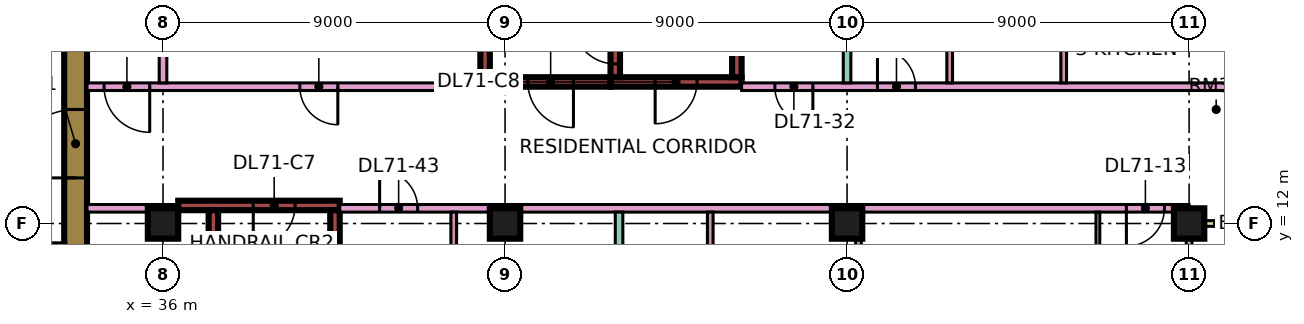
"""IFC4 building model, lengths in metres.
Left out: names, types, materials, properties, quantities, classifications, styles, units other than length and angle.
Written with IfcOpenShell. Run it as: python <this file> out.ifc"""

import sys

from ifc_helpers import new_model, si_unit, direction, frame, frame_2d, origin, origin_2d, place, context, subcontext, project, spatial, rectangle, extrude, element, fill, save


model = new_model("IFC4")
c1 = context("Model", 3, precision=1e-05, world=origin(), true_north=direction((0.0, 1.0)))
c2 = subcontext(c1, "Body", "Model", "MODEL_VIEW")
j1 = project(units=[si_unit("LENGTHUNIT", "METRE"), si_unit("PLANEANGLEUNIT", "RADIAN")], contexts=[c1])
p1 = place(None, origin())
s1 = spatial("IfcSite", under=j1, at=p1, CompositionType="ELEMENT")
p2 = place(p1, origin())
s2 = spatial("IfcBuilding", under=s1, at=p2, CompositionType="ELEMENT")
p3 = place(p2, frame((0.0, 0.0, 303.4)))
s3 = spatial("IfcBuildingStorey", under=s2, at=p3, CompositionType="ELEMENT", Elevation=303.4)
for number, where, z_axis, x_axis in (
    (1, (36.0, 12.0, 0.0), (0.0, 0.0, 1.0), (1.0, 0.0, 0.0)),
    (2, (45.0, 12.0, 0.0), (0.0, 0.0, 1.0), (1.0, 0.0, 0.0)),
    (3, (54.0, 12.0, 0.0), (0.0, 0.0, 1.0), (1.0, 0.0, 0.0)),
    (4, (63.0, 12.0, 0.0), (0.0, 0.0, 1.0), (1.0, 0.0, 0.0)),
):
    element("IfcColumn", number, at=place(p3, frame(where, z_axis=z_axis, x_axis=x_axis)), inside=s3, PredefinedType="COLUMN", context=c2, shape_type="SweptSolid", body=[
        extrude(rectangle(XDim=0.8, YDim=0.8, at=origin_2d()), origin(), (0.0, 0.0, 1.0), 3.75),
    ])
p4 = place(p3, frame((33.7, 7.6, 0.0), z_axis=(0.0, 0.0, 1.0), x_axis=(0.0, 1.0, 0.0)))
e5 = element("IfcWall", 5, at=p4, inside=s3, PredefinedType="SHEAR", context=c2, shape_type="SweptSolid", body=[
    extrude(rectangle(XDim=11.8, YDim=0.6, at=frame_2d((5.9, 0.0))), origin(), (0.0, 0.0, 1.0), 3.75),
])
p5 = place(p4, frame((5.6, 0.0, 0.0)))
e6 = element("IfcOpeningElement", 6, at=p5, cuts=e5, PredefinedType="OPENING", context=c2, shape_type="SweptSolid", body=[
    extrude(rectangle(XDim=1.8, YDim=2.4, at=frame_2d((0.9, 1.2))), frame((0.0, 0.31, 0.0), z_axis=(0.0, -1.0, 0.0), x_axis=(1.0, 0.0, 0.0)), (0.0, 0.0, 1.0), 0.62),
])
p6 = place(p3, frame((36.4, 12.475, 0.0), z_axis=(0.0, 0.0, 1.0), x_axis=(1.0, 0.0, 0.0)))
e7 = element("IfcWall", 7, at=p6, inside=s3, PredefinedType="SHEAR", context=c2, shape_type="SweptSolid", body=[
    extrude(rectangle(XDim=4.25, YDim=0.25, at=frame_2d((2.125, 0.0))), origin(), (0.0, 0.0, 1.0), 3.75),
])
p7 = place(p6, frame((1.975, 0.0, 0.0)))
e8 = element("IfcOpeningElement", 8, at=p7, cuts=e7, PredefinedType="OPENING", context=c2, shape_type="SweptSolid", body=[
    extrude(rectangle(XDim=1.1, YDim=2.2, at=frame_2d((0.55, 1.1))), frame((0.0, 0.135, 0.0), z_axis=(0.0, -1.0, 0.0), x_axis=(1.0, 0.0, 0.0)), (0.0, 0.0, 1.0), 0.27),
])
for number, where, z_axis, x_axis in (
    (9, (37.325, 5.85, 0.0), (0.0, 0.0, 1.0), (0.0, 1.0, 0.0)),
    (10, (40.525, 5.85, 0.0), (0.0, 0.0, 1.0), (0.0, 1.0, 0.0)),
):
    element("IfcWall", number, at=place(p3, frame(where, z_axis=z_axis, x_axis=x_axis)), inside=s3, PredefinedType="SHEAR", context=c2, shape_type="SweptSolid", body=[
        extrude(rectangle(XDim=6.5, YDim=0.25, at=frame_2d((3.25, 0.0))), origin(), (0.0, 0.0, 1.0), 3.75),
    ])
p8 = place(p3, frame((47.775, 15.725, 0.0), z_axis=(0.0, 0.0, 1.0), x_axis=(1.0, 0.0, 0.0)))
e11 = element("IfcWall", 11, at=p8, inside=s3, PredefinedType="SHEAR", context=c2, shape_type="SweptSolid", body=[
    extrude(rectangle(XDim=3.45, YDim=0.25, at=frame_2d((1.725, 0.0))), origin(), (0.0, 0.0, 1.0), 3.75),
])
p9 = place(p8, frame((1.175, 0.0, 0.0)))
e12 = element("IfcOpeningElement", 12, at=p9, cuts=e11, PredefinedType="OPENING", context=c2, shape_type="SweptSolid", body=[
    extrude(rectangle(XDim=1.1, YDim=2.2, at=frame_2d((0.55, 1.1))), frame((0.0, 0.135, 0.0), z_axis=(0.0, -1.0, 0.0), x_axis=(1.0, 0.0, 0.0)), (0.0, 0.0, 1.0), 0.27),
])
p10 = place(p3, frame((47.9, 15.85, 0.0), z_axis=(0.0, 0.0, 1.0), x_axis=(0.0, 1.0, 0.0)))
e13 = element("IfcWall", 13, at=p10, inside=s3, PredefinedType="SHEAR", context=c2, shape_type="SweptSolid", body=[
    extrude(rectangle(XDim=6.5, YDim=0.25, at=frame_2d((3.25, 0.0))), origin(), (0.0, 0.0, 1.0), 3.75),
])
p11 = place(p10, frame((0.35, 0.0, 0.0)))
e14 = element("IfcOpeningElement", 14, at=p11, cuts=e13, PredefinedType="OPENING", context=c2, shape_type="SweptSolid", body=[
    extrude(rectangle(XDim=1.1, YDim=2.2, at=frame_2d((0.55, 1.1))), frame((0.0, 0.135, 0.0), z_axis=(0.0, -1.0, 0.0), x_axis=(1.0, 0.0, 0.0)), (0.0, 0.0, 1.0), 0.27),
])
p12 = place(p3, frame((51.1, 15.85, 0.0), z_axis=(0.0, 0.0, 1.0), x_axis=(0.0, 1.0, 0.0)))
e15 = element("IfcWall", 15, at=p12, inside=s3, PredefinedType="SHEAR", context=c2, shape_type="SweptSolid", body=[
    extrude(rectangle(XDim=6.5, YDim=0.25, at=frame_2d((3.25, 0.0))), origin(), (0.0, 0.0, 1.0), 3.75),
])
p13 = place(p3, frame((44.35, 15.725, 0.0), z_axis=(0.0, 0.0, 1.0), x_axis=(1.0, 0.0, 0.0)))
e16 = element("IfcWall", 16, at=p13, inside=s3, PredefinedType="SHEAR", context=c2, shape_type="SweptSolid", body=[
    extrude(rectangle(XDim=3.425, YDim=0.25, at=frame_2d((1.712, 0.0))), origin(), (0.0, 0.0, 1.0), 3.75),
])
p14 = place(p13, frame((1.25, 0.0, 0.0)))
e17 = element("IfcOpeningElement", 17, at=p14, cuts=e16, PredefinedType="OPENING", context=c2, shape_type="SweptSolid", body=[
    extrude(rectangle(XDim=1.2, YDim=2.2, at=frame_2d((0.6, 1.1))), frame((0.0, 0.135, 0.0), z_axis=(0.0, -1.0, 0.0), x_axis=(1.0, 0.0, 0.0)), (0.0, 0.0, 1.0), 0.27),
])
p15 = place(p3, frame((44.475, 15.85, 0.0), z_axis=(0.0, 0.0, 1.0), x_axis=(0.0, 1.0, 0.0)))
e18 = element("IfcWall", 18, at=p15, inside=s3, PredefinedType="SHEAR", context=c2, shape_type="SweptSolid", body=[
    extrude(rectangle(XDim=6.5, YDim=0.25, at=frame_2d((3.25, 0.0))), origin(), (0.0, 0.0, 1.0), 3.75),
])
p16 = place(p15, frame((1.75, 0.0, 0.0)))
e19 = element("IfcOpeningElement", 19, at=p16, cuts=e18, PredefinedType="OPENING", context=c2, shape_type="SweptSolid", body=[
    extrude(rectangle(XDim=1.1, YDim=2.2, at=frame_2d((0.55, 1.1))), frame((0.0, 0.135, 0.0), z_axis=(0.0, -1.0, 0.0), x_axis=(1.0, 0.0, 0.0)), (0.0, 0.0, 1.0), 0.27),
])
p17 = place(p15, frame((4.3, 0.0, 0.0)))
e20 = element("IfcOpeningElement", 20, at=p17, cuts=e18, PredefinedType="OPENING", context=c2, shape_type="SweptSolid", body=[
    extrude(rectangle(XDim=1.1, YDim=2.2, at=frame_2d((0.55, 1.1))), frame((0.0, 0.135, 0.0), z_axis=(0.0, -1.0, 0.0), x_axis=(1.0, 0.0, 0.0)), (0.0, 0.0, 1.0), 0.27),
])
p18 = place(p3, frame((63.0, 1.575, 0.0), z_axis=(0.0, 0.0, 1.0), x_axis=(0.0, 1.0, 0.0)))
e21 = element("IfcWall", 21, at=p18, inside=s3, PredefinedType="SOLIDWALL", context=c2, shape_type="SweptSolid", body=[
    extrude(rectangle(XDim=10.35, YDim=0.15, at=frame_2d((5.175, 0.0))), origin(), (0.0, 0.0, 1.0), 3.35),
])
p19 = place(p18, frame((4.062, 0.0, 0.0)))
e22 = element("IfcOpeningElement", 22, at=p19, cuts=e21, PredefinedType="OPENING", context=c2, shape_type="SweptSolid", body=[
    extrude(rectangle(XDim=1.8, YDim=2.4, at=frame_2d((0.9, 1.2))), frame((0.0, 0.085, 0.0), z_axis=(0.0, -1.0, 0.0), x_axis=(1.0, 0.0, 0.0)), (0.0, 0.0, 1.0), 0.17),
])
p20 = place(p3, frame((64.5, 12.0, 0.0), z_axis=(0.0, 0.0, 1.0), x_axis=(-1.0, 0.0, 0.0)))
e23 = element("IfcWall", 23, at=p20, inside=s3, PredefinedType="SOLIDWALL", context=c2, shape_type="SweptSolid", body=[
    extrude(rectangle(XDim=1.5, YDim=0.15, at=frame_2d((0.75, 0.0))), origin(), (0.0, 0.0, 1.0), 3.35),
])
p21 = place(p3, frame((34.0, 12.4, 0.0), z_axis=(0.0, 0.0, 1.0), x_axis=(1.0, 0.0, 0.0)))
e24 = element("IfcWall", 24, at=p21, inside=s3, PredefinedType="PARTITIONING", context=c2, shape_type="SweptSolid", body=[
    extrude(rectangle(XDim=2.401, YDim=0.2, at=frame_2d((1.2, 0.0))), origin(), (0.0, 0.0, 1.0), 3.35),
])
p22 = place(p3, frame((34.0, 15.6, 0.0), z_axis=(0.0, 0.0, 1.0), x_axis=(1.0, 0.0, 0.0)))
e25 = element("IfcWall", 25, at=p22, inside=s3, PredefinedType="PARTITIONING", context=c2, shape_type="SweptSolid", body=[
    extrude(rectangle(XDim=10.35, YDim=0.2, at=frame_2d((5.175, 0.0))), origin(), (0.0, 0.0, 1.0), 3.35),
])
p23 = place(p22, frame((5.6, 0.0, 0.0)))
e26 = element("IfcOpeningElement", 26, at=p23, cuts=e25, PredefinedType="OPENING", context=c2, shape_type="SweptSolid", body=[
    extrude(rectangle(XDim=1.0, YDim=2.1, at=frame_2d((0.5, 1.05))), frame((0.0, 0.11, 0.0), z_axis=(0.0, -1.0, 0.0), x_axis=(1.0, 0.0, 0.0)), (0.0, 0.0, 1.0), 0.22),
])
p24 = place(p22, frame((0.45, 0.0, 0.0)))
e27 = element("IfcOpeningElement", 27, at=p24, cuts=e25, PredefinedType="OPENING", context=c2, shape_type="SweptSolid", body=[
    extrude(rectangle(XDim=1.2, YDim=2.1, at=frame_2d((0.6, 1.05))), frame((0.0, 0.11, 0.0), z_axis=(0.0, -1.0, 0.0), x_axis=(1.0, 0.0, 0.0)), (0.0, 0.0, 1.0), 0.22),
])
p25 = place(p3, frame((36.0, 15.7, 0.0), z_axis=(0.0, 0.0, 1.0), x_axis=(0.0, 1.0, 0.0)))
e28 = element("IfcWall", 28, at=p25, inside=s3, PredefinedType="PARTITIONING", context=c2, shape_type="SweptSolid", body=[
    extrude(rectangle(XDim=8.3, YDim=0.2, at=frame_2d((4.15, 0.0))), origin(), (0.0, 0.0, 1.0), 3.35),
])
p26 = place(p3, frame((40.65, 12.4, 0.0), z_axis=(0.0, 0.0, 1.0), x_axis=(1.0, 0.0, 0.0)))
e29 = element("IfcWall", 29, at=p26, inside=s3, PredefinedType="PARTITIONING", context=c2, shape_type="SweptSolid", body=[
    extrude(rectangle(XDim=22.35, YDim=0.2, at=frame_2d((11.175, 0.0))), origin(), (0.0, 0.0, 1.0), 3.35),
])
p27 = place(p26, frame((20.7, 0.0, 0.0)))
e30 = element("IfcOpeningElement", 30, at=p27, cuts=e29, PredefinedType="OPENING", context=c2, shape_type="SweptSolid", body=[
    extrude(rectangle(XDim=1.0, YDim=2.1, at=frame_2d((0.5, 1.05))), frame((0.0, 0.11, 0.0), z_axis=(0.0, -1.0, 0.0), x_axis=(1.0, 0.0, 0.0)), (0.0, 0.0, 1.0), 0.22),
])
p28 = place(p26, frame((1.05, 0.0, 0.0)))
e31 = element("IfcOpeningElement", 31, at=p28, cuts=e29, PredefinedType="OPENING", context=c2, shape_type="SweptSolid", body=[
    extrude(rectangle(XDim=1.0, YDim=2.1, at=frame_2d((0.5, 1.05))), frame((0.0, 0.11, 0.0), z_axis=(0.0, -1.0, 0.0), x_axis=(1.0, 0.0, 0.0)), (0.0, 0.0, 1.0), 0.22),
])
p29 = place(p3, frame((43.65, 5.825, 0.0), z_axis=(0.0, 0.0, 1.0), x_axis=(0.0, 1.0, 0.0)))
e32 = element("IfcWall", 32, at=p29, inside=s3, PredefinedType="PARTITIONING", context=c2, shape_type="SweptSolid", body=[
    extrude(rectangle(XDim=6.475, YDim=0.15, at=frame_2d((3.238, 0.0))), origin(), (0.0, 0.0, 1.0), 3.35),
])
p30 = place(p29, frame((4.425, 0.0, 0.0)))
e33 = element("IfcOpeningElement", 33, at=p30, cuts=e32, PredefinedType="OPENING", context=c2, shape_type="SweptSolid", body=[
    extrude(rectangle(XDim=0.9, YDim=2.1, at=frame_2d((0.45, 1.05))), frame((0.0, 0.085, 0.0), z_axis=(0.0, -1.0, 0.0), x_axis=(1.0, 0.0, 0.0)), (0.0, 0.0, 1.0), 0.17),
])
p31 = place(p3, frame((48.0, 0.0, 0.0), z_axis=(0.0, 0.0, 1.0), x_axis=(0.0, 1.0, 0.0)))
e34 = element("IfcWall", 34, at=p31, inside=s3, PredefinedType="PARTITIONING", context=c2, shape_type="SweptSolid", body=[
    extrude(rectangle(XDim=12.3, YDim=0.2, at=frame_2d((6.15, 0.0))), origin(), (0.0, 0.0, 1.0), 3.35),
])
p32 = place(p3, frame((50.4, 7.675, 0.0), z_axis=(0.0, 0.0, 1.0), x_axis=(0.0, 1.0, 0.0)))
e35 = element("IfcWall", 35, at=p32, inside=s3, PredefinedType="PARTITIONING", context=c2, shape_type="SweptSolid", body=[
    extrude(rectangle(XDim=4.625, YDim=0.15, at=frame_2d((2.312, 0.0))), origin(), (0.0, 0.0, 1.0), 3.35),
])
p33 = place(p3, frame((51.225, 15.6, 0.0), z_axis=(0.0, 0.0, 1.0), x_axis=(1.0, 0.0, 0.0)))
e36 = element("IfcWall", 36, at=p33, inside=s3, PredefinedType="PARTITIONING", context=c2, shape_type="SweptSolid", body=[
    extrude(rectangle(XDim=13.125, YDim=0.2, at=frame_2d((6.562, 0.0))), origin(), (0.0, 0.0, 1.0), 3.35),
])
p34 = place(p33, frame((3.575, 0.0, 0.0)))
e37 = element("IfcOpeningElement", 37, at=p34, cuts=e36, PredefinedType="OPENING", context=c2, shape_type="SweptSolid", body=[
    extrude(rectangle(XDim=1.0, YDim=2.1, at=frame_2d((0.5, 1.05))), frame((0.0, 0.11, 0.0), z_axis=(0.0, -1.0, 0.0), x_axis=(1.0, 0.0, 0.0)), (0.0, 0.0, 1.0), 0.22),
])
p35 = place(p33, frame((0.875, 0.0, 0.0)))
e38 = element("IfcOpeningElement", 38, at=p35, cuts=e36, PredefinedType="OPENING", context=c2, shape_type="SweptSolid", body=[
    extrude(rectangle(XDim=1.0, YDim=2.1, at=frame_2d((0.5, 1.05))), frame((0.0, 0.11, 0.0), z_axis=(0.0, -1.0, 0.0), x_axis=(1.0, 0.0, 0.0)), (0.0, 0.0, 1.0), 0.22),
])
p36 = place(p3, frame((54.0, 15.7, 0.0), z_axis=(0.0, 0.0, 1.0), x_axis=(0.0, 1.0, 0.0)))
e39 = element("IfcWall", 39, at=p36, inside=s3, PredefinedType="PARTITIONING", context=c2, shape_type="SweptSolid", body=[
    extrude(rectangle(XDim=8.226, YDim=0.2, at=frame_2d((4.113, 0.0))), origin(), (0.0, 0.0, 1.0), 3.35),
])
p37 = place(p3, frame((54.3, 7.675, 0.0), z_axis=(0.0, 0.0, 1.0), x_axis=(0.0, 1.0, 0.0)))
e40 = element("IfcWall", 40, at=p37, inside=s3, PredefinedType="PARTITIONING", context=c2, shape_type="SweptSolid", body=[
    extrude(rectangle(XDim=4.625, YDim=0.15, at=frame_2d((2.312, 0.0))), origin(), (0.0, 0.0, 1.0), 3.35),
])
for number, where, z_axis, x_axis in (
    (41, (56.7, 15.7, 0.0), (0.0, 0.0, 1.0), (0.0, 1.0, 0.0)),
    (42, (59.7, 15.7, 0.0), (0.0, 0.0, 1.0), (0.0, 1.0, 0.0)),
):
    element("IfcWall", number, at=place(p3, frame(where, z_axis=z_axis, x_axis=x_axis)), inside=s3, PredefinedType="PARTITIONING", context=c2, shape_type="SweptSolid", body=[
        extrude(rectangle(XDim=2.525, YDim=0.15, at=frame_2d((1.263, 0.0))), origin(), (0.0, 0.0, 1.0), 3.35),
    ])
p38 = place(p3, frame((60.6, 7.675, 0.0), z_axis=(0.0, 0.0, 1.0), x_axis=(0.0, 1.0, 0.0)))
e43 = element("IfcWall", 43, at=p38, inside=s3, PredefinedType="PARTITIONING", context=c2, shape_type="SweptSolid", body=[
    extrude(rectangle(XDim=4.625, YDim=0.1, at=frame_2d((2.312, 0.0))), origin(), (0.0, 0.0, 1.0), 3.35),
])
p39 = place(p38, frame((1.875, 0.0, 0.0)))
e44 = element("IfcOpeningElement", 44, at=p39, cuts=e43, PredefinedType="OPENING", context=c2, shape_type="SweptSolid", body=[
    extrude(rectangle(XDim=0.9, YDim=2.1, at=frame_2d((0.45, 1.05))), frame((0.0, 0.06, 0.0), z_axis=(0.0, -1.0, 0.0), x_axis=(1.0, 0.0, 0.0)), (0.0, 0.0, 1.0), 0.12),
])
p40 = place(p5, origin())
e45 = element("IfcDoor", 45, at=p40, inside=s3, OperationType="DOUBLE_DOOR_SINGLE_SWING", PredefinedType="DOOR", context=c2, shape_type="SweptSolid", body=[
    extrude(rectangle(XDim=1.8, YDim=2.4, at=frame_2d((0.9, 1.2))), frame((0.0, 0.025, 0.0), z_axis=(0.0, -1.0, 0.0), x_axis=(1.0, 0.0, 0.0)), (0.0, 0.0, 1.0), 0.05),
])
fill(e6, e45)
p41 = place(p7, frame((1.1, 0.0, 0.0), z_axis=(0.0, 0.0, 1.0), x_axis=(-1.0, 0.0, 0.0)))
e46 = element("IfcDoor", 46, at=p41, inside=s3, OperationType="SINGLE_SWING_LEFT", PredefinedType="DOOR", context=c2, shape_type="SweptSolid", body=[
    extrude(rectangle(XDim=1.1, YDim=2.2, at=frame_2d((0.55, 1.1))), frame((0.0, 0.025, 0.0), z_axis=(0.0, -1.0, 0.0), x_axis=(1.0, 0.0, 0.0)), (0.0, 0.0, 1.0), 0.05),
])
fill(e8, e46)
p42 = place(p9, frame((1.1, 0.0, 0.0), z_axis=(0.0, 0.0, 1.0), x_axis=(-1.0, 0.0, 0.0)))
e47 = element("IfcDoor", 47, at=p42, inside=s3, OperationType="SINGLE_SWING_LEFT", PredefinedType="DOOR", context=c2, shape_type="SweptSolid", body=[
    extrude(rectangle(XDim=1.1, YDim=2.2, at=frame_2d((0.55, 1.1))), frame((0.0, 0.025, 0.0), z_axis=(0.0, -1.0, 0.0), x_axis=(1.0, 0.0, 0.0)), (0.0, 0.0, 1.0), 0.05),
])
fill(e12, e47)
p43 = place(p14, origin())
e48 = element("IfcDoor", 48, at=p43, inside=s3, OperationType="SINGLE_SWING_RIGHT", PredefinedType="DOOR", context=c2, shape_type="SweptSolid", body=[
    extrude(rectangle(XDim=1.2, YDim=2.2, at=frame_2d((0.6, 1.1))), frame((0.0, 0.025, 0.0), z_axis=(0.0, -1.0, 0.0), x_axis=(1.0, 0.0, 0.0)), (0.0, 0.0, 1.0), 0.05),
])
fill(e17, e48)
p44 = place(p11, frame((1.1, 0.0, 0.0), z_axis=(0.0, 0.0, 1.0), x_axis=(-1.0, 0.0, 0.0)))
e49 = element("IfcDoor", 49, at=p44, inside=s3, OperationType="SINGLE_SWING_RIGHT", PredefinedType="DOOR", context=c2, shape_type="SweptSolid", body=[
    extrude(rectangle(XDim=1.1, YDim=2.2, at=frame_2d((0.55, 1.1))), frame((0.0, 0.025, 0.0), z_axis=(0.0, -1.0, 0.0), x_axis=(1.0, 0.0, 0.0)), (0.0, 0.0, 1.0), 0.05),
])
fill(e14, e49)
p45 = place(p23, origin())
e50 = element("IfcDoor", 50, at=p45, inside=s3, OperationType="SINGLE_SWING_RIGHT", PredefinedType="DOOR", context=c2, shape_type="SweptSolid", body=[
    extrude(rectangle(XDim=1.0, YDim=2.1, at=frame_2d((0.5, 1.05))), frame((0.0, 0.025, 0.0), z_axis=(0.0, -1.0, 0.0), x_axis=(1.0, 0.0, 0.0)), (0.0, 0.0, 1.0), 0.05),
])
fill(e26, e50)
p46 = place(p34, origin())
e51 = element("IfcDoor", 51, at=p46, inside=s3, OperationType="SINGLE_SWING_LEFT", PredefinedType="DOOR", context=c2, shape_type="SweptSolid", body=[
    extrude(rectangle(XDim=1.0, YDim=2.1, at=frame_2d((0.5, 1.05))), frame((0.0, 0.025, 0.0), z_axis=(0.0, -1.0, 0.0), x_axis=(1.0, 0.0, 0.0)), (0.0, 0.0, 1.0), 0.05),
])
fill(e37, e51)
p47 = place(p27, frame((1.0, 0.0, 0.0), z_axis=(0.0, 0.0, 1.0), x_axis=(-1.0, 0.0, 0.0)))
e52 = element("IfcDoor", 52, at=p47, inside=s3, OperationType="SINGLE_SWING_LEFT", PredefinedType="DOOR", context=c2, shape_type="SweptSolid", body=[
    extrude(rectangle(XDim=1.0, YDim=2.1, at=frame_2d((0.5, 1.05))), frame((0.0, 0.025, 0.0), z_axis=(0.0, -1.0, 0.0), x_axis=(1.0, 0.0, 0.0)), (0.0, 0.0, 1.0), 0.05),
])
fill(e30, e52)
p48 = place(p24, origin())
e53 = element("IfcDoor", 53, at=p48, inside=s3, OperationType="SINGLE_SWING_RIGHT", PredefinedType="DOOR", context=c2, shape_type="SweptSolid", body=[
    extrude(rectangle(XDim=1.2, YDim=2.1, at=frame_2d((0.6, 1.05))), frame((0.0, 0.025, 0.0), z_axis=(0.0, -1.0, 0.0), x_axis=(1.0, 0.0, 0.0)), (0.0, 0.0, 1.0), 0.05),
])
fill(e27, e53)
p49 = place(p35, origin())
e54 = element("IfcDoor", 54, at=p49, inside=s3, OperationType="SINGLE_SWING_RIGHT", PredefinedType="DOOR", context=c2, shape_type="SweptSolid", body=[
    extrude(rectangle(XDim=1.0, YDim=2.1, at=frame_2d((0.5, 1.05))), frame((0.0, 0.025, 0.0), z_axis=(0.0, -1.0, 0.0), x_axis=(1.0, 0.0, 0.0)), (0.0, 0.0, 1.0), 0.05),
])
fill(e38, e54)
p50 = place(p28, origin())
e55 = element("IfcDoor", 55, at=p50, inside=s3, OperationType="SINGLE_SWING_LEFT", PredefinedType="DOOR", context=c2, shape_type="SweptSolid", body=[
    extrude(rectangle(XDim=1.0, YDim=2.1, at=frame_2d((0.5, 1.05))), frame((0.0, 0.025, 0.0), z_axis=(0.0, -1.0, 0.0), x_axis=(1.0, 0.0, 0.0)), (0.0, 0.0, 1.0), 0.05),
])
fill(e31, e55)
save(model, sys.argv[1])
